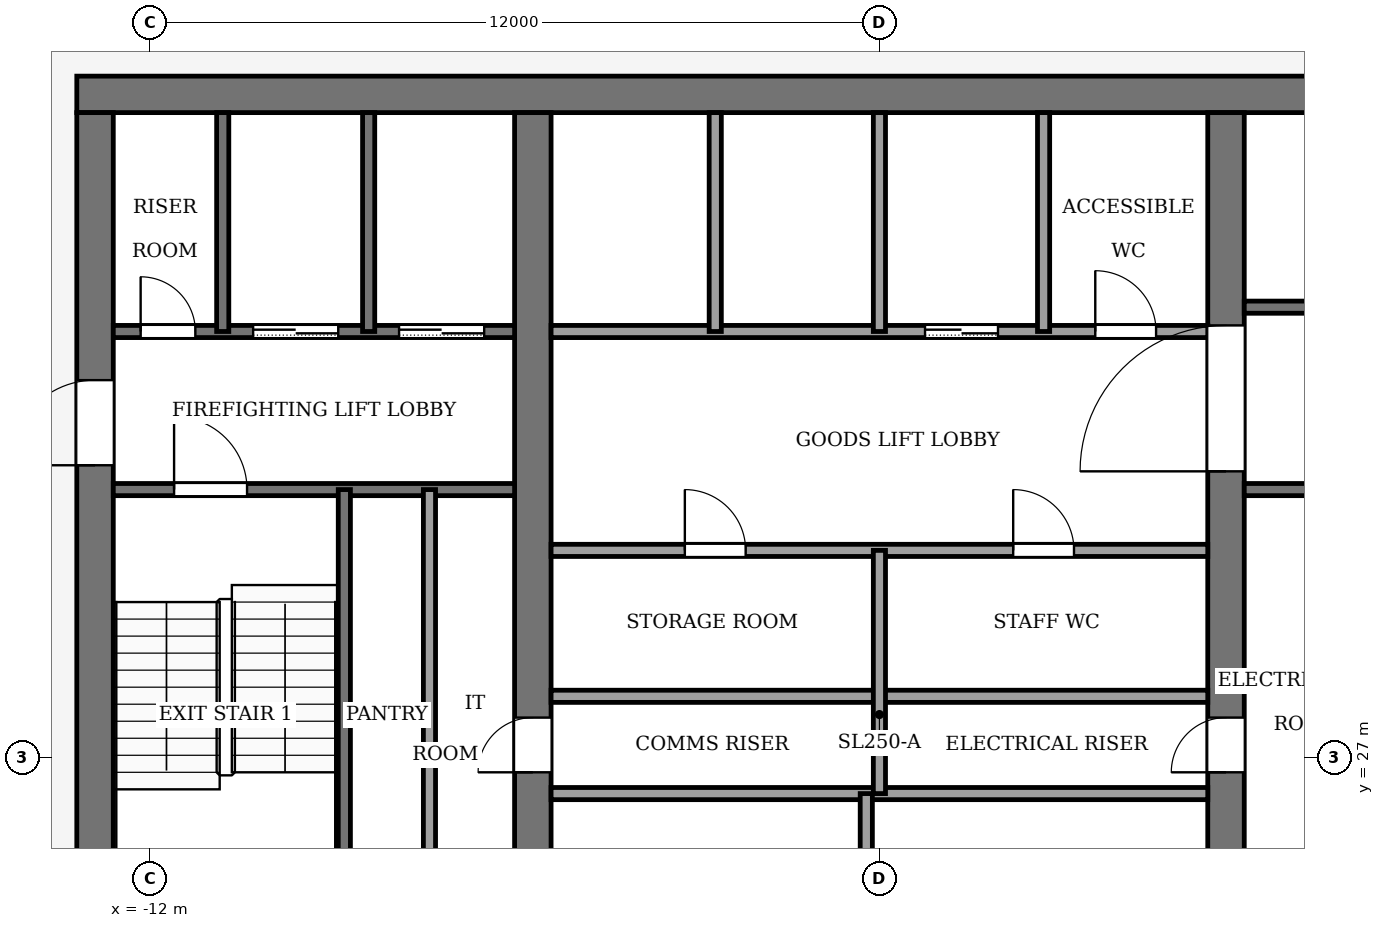
"""IFC4 building model, lengths in metres.
Left out: names, types, materials, properties, quantities, classifications, styles, units other than length and angle.
Written with IfcOpenShell. Run it as: python <this file> out.ifc"""

import sys

from ifc_helpers import new_model, si_unit, direction, frame, frame_2d, origin, place, context, subcontext, project, spatial, rectangle, extrude, element, fill, save


model = new_model("IFC4")
c1 = context("Model", 3, precision=1e-05, world=origin(), true_north=direction((0.0, 1.0)))
c2 = subcontext(c1, "Body", "Model", "MODEL_VIEW")
j1 = project(units=[si_unit("LENGTHUNIT", "METRE"), si_unit("PLANEANGLEUNIT", "RADIAN")], contexts=[c1])
p1 = place(None, origin())
s1 = spatial("IfcSite", under=j1, at=p1, CompositionType="ELEMENT")
p2 = place(p1, origin())
s2 = spatial("IfcBuilding", under=s1, at=p2, CompositionType="ELEMENT")
p3 = place(p2, frame((0.0, 0.0, 302.0)))
s3 = spatial("IfcBuildingStorey", under=s2, at=p3, CompositionType="ELEMENT", Elevation=302.0)
p4 = place(p3, frame((-13.2, 37.9, -0.13), z_axis=(0.0, 0.0, 1.0), x_axis=(1.0, 0.0, 0.0)))
e1 = element("IfcWall", 1, at=p4, inside=s3, PredefinedType="SHEAR", context=c2, shape_type="SweptSolid", body=[
    extrude(rectangle(XDim=26.4, YDim=0.6, at=frame_2d((13.2, 0.0))), origin(), (0.0, 0.0, 1.0), 4.0),
])
p5 = place(p3, frame((-12.9, 18.4, -0.13), z_axis=(0.0, 0.0, 1.0), x_axis=(0.0, 1.0, 0.0)))
e2 = element("IfcWall", 2, at=p5, inside=s3, PredefinedType="SHEAR", context=c2, shape_type="SweptSolid", body=[
    extrude(rectangle(XDim=19.2, YDim=0.6, at=frame_2d((9.6, 0.0))), origin(), (0.0, 0.0, 1.0), 4.0),
])
p6 = place(p5, frame((2.8, 0.0, 0.13)))
e3 = element("IfcOpeningElement", 3, at=p6, cuts=e2, PredefinedType="OPENING", context=c2, shape_type="SweptSolid", body=[
    extrude(rectangle(XDim=2.4, YDim=2.4, at=frame_2d((1.2, 1.2))), frame((0.0, 0.31, 0.0), z_axis=(0.0, -1.0, 0.0), x_axis=(1.0, 0.0, 0.0)), (0.0, 0.0, 1.0), 0.62),
])
p7 = place(p5, frame((13.4, 0.0, 0.13)))
e4 = element("IfcOpeningElement", 4, at=p7, cuts=e2, PredefinedType="OPENING", context=c2, shape_type="SweptSolid", body=[
    extrude(rectangle(XDim=1.4, YDim=2.2, at=frame_2d((0.7, 1.1))), frame((0.0, 0.31, 0.0), z_axis=(0.0, -1.0, 0.0), x_axis=(1.0, 0.0, 0.0)), (0.0, 0.0, 1.0), 0.62),
])
p8 = place(p3, frame((-5.7, 18.4, -0.13), z_axis=(0.0, 0.0, 1.0), x_axis=(0.0, 1.0, 0.0)))
e5 = element("IfcWall", 5, at=p8, inside=s3, PredefinedType="SHEAR", context=c2, shape_type="SweptSolid", body=[
    extrude(rectangle(XDim=19.2, YDim=0.6, at=frame_2d((9.6, 0.0))), origin(), (0.0, 0.0, 1.0), 4.0),
])
p9 = place(p8, frame((8.35, 0.0, 0.13)))
e6 = element("IfcOpeningElement", 6, at=p9, cuts=e5, PredefinedType="OPENING", context=c2, shape_type="SweptSolid", body=[
    extrude(rectangle(XDim=0.9, YDim=2.1, at=frame_2d((0.45, 1.05))), frame((0.0, 0.31, 0.0), z_axis=(0.0, -1.0, 0.0), x_axis=(1.0, 0.0, 0.0)), (0.0, 0.0, 1.0), 0.62),
])
p10 = place(p3, frame((5.7, 18.4, -0.13), z_axis=(0.0, 0.0, 1.0), x_axis=(0.0, 1.0, 0.0)))
e7 = element("IfcWall", 7, at=p10, inside=s3, PredefinedType="SHEAR", context=c2, shape_type="SweptSolid", body=[
    extrude(rectangle(XDim=19.2, YDim=0.6, at=frame_2d((9.6, 0.0))), origin(), (0.0, 0.0, 1.0), 4.0),
])
p11 = place(p10, frame((8.35, 0.0, 0.13)))
e8 = element("IfcOpeningElement", 8, at=p11, cuts=e7, PredefinedType="OPENING", context=c2, shape_type="SweptSolid", body=[
    extrude(rectangle(XDim=0.9, YDim=2.1, at=frame_2d((0.45, 1.05))), frame((0.0, 0.31, 0.0), z_axis=(0.0, -1.0, 0.0), x_axis=(1.0, 0.0, 0.0)), (0.0, 0.0, 1.0), 0.62),
])
p12 = place(p10, frame((13.3, 0.0, 0.13)))
e9 = element("IfcOpeningElement", 9, at=p12, cuts=e7, PredefinedType="OPENING", context=c2, shape_type="SweptSolid", body=[
    extrude(rectangle(XDim=2.4, YDim=2.4, at=frame_2d((1.2, 1.2))), frame((0.0, 0.31, 0.0), z_axis=(0.0, -1.0, 0.0), x_axis=(1.0, 0.0, 0.0)), (0.0, 0.0, 1.0), 0.62),
])
for number, where, z_axis, x_axis in (
    (10, (-5.4, 26.4, 0.0), (0.0, 0.0, 1.0), (1.0, 0.0, 0.0)),
    (11, (-5.4, 28.0, 0.0), (0.0, 0.0, 1.0), (1.0, 0.0, 0.0)),
):
    element("IfcWall", number, at=place(p3, frame(where, z_axis=z_axis, x_axis=x_axis)), inside=s3, PredefinedType="PARTITIONING", context=c2, shape_type="SweptSolid", body=[
        extrude(rectangle(XDim=10.8, YDim=0.2, at=frame_2d((5.4, 0.0))), origin(), (0.0, 0.0, 1.0), 3.87),
    ])
p13 = place(p3, frame((-5.4, 30.4, 0.0), z_axis=(0.0, 0.0, 1.0), x_axis=(1.0, 0.0, 0.0)))
e12 = element("IfcWall", 12, at=p13, inside=s3, PredefinedType="PARTITIONING", context=c2, shape_type="SweptSolid", body=[
    extrude(rectangle(XDim=10.8, YDim=0.2, at=frame_2d((5.4, 0.0))), origin(), (0.0, 0.0, 1.0), 3.87),
])
p14 = place(p13, frame((2.2, 0.0, 0.0)))
e13 = element("IfcOpeningElement", 13, at=p14, cuts=e12, PredefinedType="OPENING", context=c2, shape_type="SweptSolid", body=[
    extrude(rectangle(XDim=1.0, YDim=2.1, at=frame_2d((0.5, 1.05))), frame((0.0, 0.11, 0.0), z_axis=(0.0, -1.0, 0.0), x_axis=(1.0, 0.0, 0.0)), (0.0, 0.0, 1.0), 0.22),
])
p15 = place(p13, frame((7.6, 0.0, 0.0)))
e14 = element("IfcOpeningElement", 14, at=p15, cuts=e12, PredefinedType="OPENING", context=c2, shape_type="SweptSolid", body=[
    extrude(rectangle(XDim=1.0, YDim=2.1, at=frame_2d((0.5, 1.05))), frame((0.0, 0.11, 0.0), z_axis=(0.0, -1.0, 0.0), x_axis=(1.0, 0.0, 0.0)), (0.0, 0.0, 1.0), 0.22),
])
p16 = place(p3, frame((-12.6, 31.4, 0.0), z_axis=(0.0, 0.0, 1.0), x_axis=(1.0, 0.0, 0.0)))
e15 = element("IfcWall", 15, at=p16, inside=s3, PredefinedType="PARTITIONING", context=c2, shape_type="SweptSolid", body=[
    extrude(rectangle(XDim=6.6, YDim=0.2, at=frame_2d((3.3, 0.0))), origin(), (0.0, 0.0, 1.0), 3.87),
])
p17 = place(p16, frame((1.0, 0.0, 0.0)))
e16 = element("IfcOpeningElement", 16, at=p17, cuts=e15, PredefinedType="OPENING", context=c2, shape_type="SweptSolid", body=[
    extrude(rectangle(XDim=1.2, YDim=2.2, at=frame_2d((0.6, 1.1))), frame((0.0, 0.11, 0.0), z_axis=(0.0, -1.0, 0.0), x_axis=(1.0, 0.0, 0.0)), (0.0, 0.0, 1.0), 0.22),
])
p18 = place(p3, frame((6.0, 31.4, 0.0), z_axis=(0.0, 0.0, 1.0), x_axis=(1.0, 0.0, 0.0)))
e17 = element("IfcWall", 17, at=p18, inside=s3, PredefinedType="PARTITIONING", context=c2, shape_type="SweptSolid", body=[
    extrude(rectangle(XDim=6.6, YDim=0.2, at=frame_2d((3.3, 0.0))), origin(), (0.0, 0.0, 1.0), 3.87),
])
p19 = place(p3, frame((-12.6, 34.0, 0.0), z_axis=(0.0, 0.0, 1.0), x_axis=(1.0, 0.0, 0.0)))
e18 = element("IfcWall", 18, at=p19, inside=s3, PredefinedType="PARTITIONING", context=c2, shape_type="SweptSolid", body=[
    extrude(rectangle(XDim=6.6, YDim=0.2, at=frame_2d((3.3, 0.0))), origin(), (0.0, 0.0, 1.0), 3.87),
])
p20 = place(p19, frame((4.7, 0.0, 0.0)))
e19 = element("IfcOpeningElement", 19, at=p20, cuts=e18, PredefinedType="OPENING", context=c2, shape_type="SweptSolid", body=[
    extrude(rectangle(XDim=1.4, YDim=2.2, at=frame_2d((0.7, 1.1))), frame((0.0, 0.11, 0.0), z_axis=(0.0, -1.0, 0.0), x_axis=(1.0, 0.0, 0.0)), (0.0, 0.0, 1.0), 0.22),
])
p21 = place(p19, frame((2.3, 0.0, 0.0)))
e20 = element("IfcOpeningElement", 20, at=p21, cuts=e18, PredefinedType="OPENING", context=c2, shape_type="SweptSolid", body=[
    extrude(rectangle(XDim=1.4, YDim=2.2, at=frame_2d((0.7, 1.1))), frame((0.0, 0.11, 0.0), z_axis=(0.0, -1.0, 0.0), x_axis=(1.0, 0.0, 0.0)), (0.0, 0.0, 1.0), 0.22),
])
p22 = place(p19, frame((0.45, 0.0, 0.0)))
e21 = element("IfcOpeningElement", 21, at=p22, cuts=e18, PredefinedType="OPENING", context=c2, shape_type="SweptSolid", body=[
    extrude(rectangle(XDim=0.9, YDim=2.1, at=frame_2d((0.45, 1.05))), frame((0.0, 0.11, 0.0), z_axis=(0.0, -1.0, 0.0), x_axis=(1.0, 0.0, 0.0)), (0.0, 0.0, 1.0), 0.22),
])
p23 = place(p3, frame((-5.4, 34.0, 0.0), z_axis=(0.0, 0.0, 1.0), x_axis=(1.0, 0.0, 0.0)))
e22 = element("IfcWall", 22, at=p23, inside=s3, PredefinedType="PARTITIONING", context=c2, shape_type="SweptSolid", body=[
    extrude(rectangle(XDim=10.8, YDim=0.2, at=frame_2d((5.4, 0.0))), origin(), (0.0, 0.0, 1.0), 3.87),
])
p24 = place(p23, frame((6.15, 0.0, 0.0)))
e23 = element("IfcOpeningElement", 23, at=p24, cuts=e22, PredefinedType="OPENING", context=c2, shape_type="SweptSolid", body=[
    extrude(rectangle(XDim=1.2, YDim=2.2, at=frame_2d((0.6, 1.1))), frame((0.0, 0.11, 0.0), z_axis=(0.0, -1.0, 0.0), x_axis=(1.0, 0.0, 0.0)), (0.0, 0.0, 1.0), 0.22),
])
p25 = place(p23, frame((8.95, 0.0, 0.0)))
e24 = element("IfcOpeningElement", 24, at=p25, cuts=e22, PredefinedType="OPENING", context=c2, shape_type="SweptSolid", body=[
    extrude(rectangle(XDim=1.0, YDim=2.1, at=frame_2d((0.5, 1.05))), frame((0.0, 0.11, 0.0), z_axis=(0.0, -1.0, 0.0), x_axis=(1.0, 0.0, 0.0)), (0.0, 0.0, 1.0), 0.22),
])
p26 = place(p3, frame((6.0, 34.4, 0.0), z_axis=(0.0, 0.0, 1.0), x_axis=(1.0, 0.0, 0.0)))
e25 = element("IfcWall", 25, at=p26, inside=s3, PredefinedType="PARTITIONING", context=c2, shape_type="SweptSolid", body=[
    extrude(rectangle(XDim=6.6, YDim=0.2, at=frame_2d((3.3, 0.0))), origin(), (0.0, 0.0, 1.0), 3.87),
])
p27 = place(p26, frame((4.8, 0.0, 0.0)))
e26 = element("IfcOpeningElement", 26, at=p27, cuts=e25, PredefinedType="OPENING", context=c2, shape_type="SweptSolid", body=[
    extrude(rectangle(XDim=1.2, YDim=2.2, at=frame_2d((0.6, 1.1))), frame((0.0, 0.11, 0.0), z_axis=(0.0, -1.0, 0.0), x_axis=(1.0, 0.0, 0.0)), (0.0, 0.0, 1.0), 0.22),
])
p28 = place(p3, frame((-10.8, 34.0, 0.0), z_axis=(0.0, 0.0, 1.0), x_axis=(0.0, 1.0, 0.0)))
e27 = element("IfcWall", 27, at=p28, inside=s3, PredefinedType="PARTITIONING", context=c2, shape_type="SweptSolid", body=[
    extrude(rectangle(XDim=3.6, YDim=0.2, at=frame_2d((1.8, 0.0))), origin(), (0.0, 0.0, 1.0), 3.87),
])
p29 = place(p3, frame((-8.8, 24.0, 0.0), z_axis=(0.0, 0.0, 1.0), x_axis=(0.0, 1.0, 0.0)))
e28 = element("IfcWall", 28, at=p29, inside=s3, PredefinedType="PARTITIONING", context=c2, shape_type="SweptSolid", body=[
    extrude(rectangle(XDim=7.4, YDim=0.2, at=frame_2d((3.7, 0.0))), origin(), (0.0, 0.0, 1.0), 3.87),
])
p30 = place(p3, frame((-8.4, 34.0, 0.0), z_axis=(0.0, 0.0, 1.0), x_axis=(0.0, 1.0, 0.0)))
e29 = element("IfcWall", 29, at=p30, inside=s3, PredefinedType="PARTITIONING", context=c2, shape_type="SweptSolid", body=[
    extrude(rectangle(XDim=3.6, YDim=0.2, at=frame_2d((1.8, 0.0))), origin(), (0.0, 0.0, 1.0), 3.87),
])
p31 = place(p3, frame((-7.4, 24.0, 0.0), z_axis=(0.0, 0.0, 1.0), x_axis=(0.0, 1.0, 0.0)))
e30 = element("IfcWall", 30, at=p31, inside=s3, PredefinedType="PARTITIONING", context=c2, shape_type="SweptSolid", body=[
    extrude(rectangle(XDim=7.4, YDim=0.2, at=frame_2d((3.7, 0.0))), origin(), (0.0, 0.0, 1.0), 3.87),
])
p32 = place(p3, frame((-2.7, 34.0, 0.0), z_axis=(0.0, 0.0, 1.0), x_axis=(0.0, 1.0, 0.0)))
e31 = element("IfcWall", 31, at=p32, inside=s3, PredefinedType="PARTITIONING", context=c2, shape_type="SweptSolid", body=[
    extrude(rectangle(XDim=3.6, YDim=0.2, at=frame_2d((1.8, 0.0))), origin(), (0.0, 0.0, 1.0), 3.87),
])
p33 = place(p3, frame((-0.216, 24.0, 0.0), z_axis=(0.0, 0.0, 1.0), x_axis=(0.0, 1.0, 0.0)))
e32 = element("IfcWall", 32, at=p33, inside=s3, PredefinedType="PARTITIONING", context=c2, shape_type="SweptSolid", body=[
    extrude(rectangle(XDim=2.4, YDim=0.2, at=frame_2d((1.2, 0.0))), origin(), (0.0, 0.0, 1.0), 3.87),
])
p34 = place(p3, frame((0.0, 26.4, 0.0), z_axis=(0.0, 0.0, 1.0), x_axis=(0.0, 1.0, 0.0)))
e33 = element("IfcWall", 33, at=p34, inside=s3, PredefinedType="PARTITIONING", context=c2, shape_type="SweptSolid", body=[
    extrude(rectangle(XDim=4.0, YDim=0.2, at=frame_2d((2.0, 0.0))), origin(), (0.0, 0.0, 1.0), 3.87),
])
for number, where, z_axis, x_axis in (
    (34, (0.0, 34.0, 0.0), (0.0, 0.0, 1.0), (0.0, 1.0, 0.0)),
    (35, (2.7, 34.0, 0.0), (0.0, 0.0, 1.0), (0.0, 1.0, 0.0)),
):
    element("IfcWall", number, at=place(p3, frame(where, z_axis=z_axis, x_axis=x_axis)), inside=s3, PredefinedType="PARTITIONING", context=c2, shape_type="SweptSolid", body=[
        extrude(rectangle(XDim=3.6, YDim=0.2, at=frame_2d((1.8, 0.0))), origin(), (0.0, 0.0, 1.0), 3.87),
    ])
p35 = place(p24, origin())
e36 = element("IfcDoor", 36, at=p35, inside=s3, OperationType="SLIDING_TO_LEFT", PredefinedType="DOOR", context=c2, shape_type="SweptSolid", body=[
    extrude(rectangle(XDim=1.2, YDim=2.2, at=frame_2d((0.6, 1.1))), frame((0.0, 0.025, 0.0), z_axis=(0.0, -1.0, 0.0), x_axis=(1.0, 0.0, 0.0)), (0.0, 0.0, 1.0), 0.05),
])
fill(e23, e36)
p36 = place(p20, origin())
e37 = element("IfcDoor", 37, at=p36, inside=s3, OperationType="SLIDING_TO_LEFT", PredefinedType="DOOR", context=c2, shape_type="SweptSolid", body=[
    extrude(rectangle(XDim=1.4, YDim=2.2, at=frame_2d((0.7, 1.1))), frame((0.0, 0.025, 0.0), z_axis=(0.0, -1.0, 0.0), x_axis=(1.0, 0.0, 0.0)), (0.0, 0.0, 1.0), 0.05),
])
fill(e19, e37)
p37 = place(p21, origin())
e38 = element("IfcDoor", 38, at=p37, inside=s3, OperationType="SLIDING_TO_LEFT", PredefinedType="DOOR", context=c2, shape_type="SweptSolid", body=[
    extrude(rectangle(XDim=1.4, YDim=2.2, at=frame_2d((0.7, 1.1))), frame((0.0, 0.025, 0.0), z_axis=(0.0, -1.0, 0.0), x_axis=(1.0, 0.0, 0.0)), (0.0, 0.0, 1.0), 0.05),
])
fill(e20, e38)
p38 = place(p22, origin())
e39 = element("IfcDoor", 39, at=p38, inside=s3, OperationType="SINGLE_SWING_RIGHT", PredefinedType="DOOR", context=c2, shape_type="SweptSolid", body=[
    extrude(rectangle(XDim=0.9, YDim=2.1, at=frame_2d((0.45, 1.05))), frame((0.0, 0.025, 0.0), z_axis=(0.0, -1.0, 0.0), x_axis=(1.0, 0.0, 0.0)), (0.0, 0.0, 1.0), 0.05),
])
fill(e21, e39)
p39 = place(p14, origin())
e40 = element("IfcDoor", 40, at=p39, inside=s3, OperationType="SINGLE_SWING_LEFT", PredefinedType="DOOR", context=c2, shape_type="SweptSolid", body=[
    extrude(rectangle(XDim=1.0, YDim=2.1, at=frame_2d((0.5, 1.05))), frame((0.0, 0.025, 0.0), z_axis=(0.0, -1.0, 0.0), x_axis=(1.0, 0.0, 0.0)), (0.0, 0.0, 1.0), 0.05),
])
fill(e13, e40)
p40 = place(p15, origin())
e41 = element("IfcDoor", 41, at=p40, inside=s3, OperationType="SINGLE_SWING_RIGHT", PredefinedType="DOOR", context=c2, shape_type="SweptSolid", body=[
    extrude(rectangle(XDim=1.0, YDim=2.1, at=frame_2d((0.5, 1.05))), frame((0.0, 0.025, 0.0), z_axis=(0.0, -1.0, 0.0), x_axis=(1.0, 0.0, 0.0)), (0.0, 0.0, 1.0), 0.05),
])
fill(e14, e41)
p41 = place(p25, origin())
e42 = element("IfcDoor", 42, at=p41, inside=s3, OperationType="SINGLE_SWING_LEFT", PredefinedType="DOOR", context=c2, shape_type="SweptSolid", body=[
    extrude(rectangle(XDim=1.0, YDim=2.1, at=frame_2d((0.5, 1.05))), frame((0.0, 0.025, 0.0), z_axis=(0.0, -1.0, 0.0), x_axis=(1.0, 0.0, 0.0)), (0.0, 0.0, 1.0), 0.05),
])
fill(e24, e42)
p42 = place(p9, origin())
e43 = element("IfcDoor", 43, at=p42, inside=s3, OperationType="SINGLE_SWING_LEFT", PredefinedType="DOOR", context=c2, shape_type="SweptSolid", body=[
    extrude(rectangle(XDim=0.9, YDim=2.1, at=frame_2d((0.45, 1.05))), frame((0.0, 0.025, 0.0), z_axis=(0.0, -1.0, 0.0), x_axis=(1.0, 0.0, 0.0)), (0.0, 0.0, 1.0), 0.05),
])
fill(e6, e43)
p43 = place(p11, origin())
e44 = element("IfcDoor", 44, at=p43, inside=s3, OperationType="SINGLE_SWING_RIGHT", PredefinedType="DOOR", context=c2, shape_type="SweptSolid", body=[
    extrude(rectangle(XDim=0.9, YDim=2.1, at=frame_2d((0.45, 1.05))), frame((0.0, 0.025, 0.0), z_axis=(0.0, -1.0, 0.0), x_axis=(1.0, 0.0, 0.0)), (0.0, 0.0, 1.0), 0.05),
])
fill(e8, e44)
p44 = place(p17, origin())
e45 = element("IfcDoor", 45, at=p44, inside=s3, OperationType="SINGLE_SWING_RIGHT", PredefinedType="DOOR", context=c2, shape_type="SweptSolid", body=[
    extrude(rectangle(XDim=1.2, YDim=2.2, at=frame_2d((0.6, 1.1))), frame((0.0, 0.025, 0.0), z_axis=(0.0, -1.0, 0.0), x_axis=(1.0, 0.0, 0.0)), (0.0, 0.0, 1.0), 0.05),
])
fill(e16, e45)
p45 = place(p12, origin())
e46 = element("IfcDoor", 46, at=p45, inside=s3, OperationType="DOUBLE_DOOR_SINGLE_SWING", PredefinedType="DOOR", context=c2, shape_type="SweptSolid", body=[
    extrude(rectangle(XDim=2.4, YDim=2.4, at=frame_2d((1.2, 1.2))), frame((0.0, 0.025, 0.0), z_axis=(0.0, -1.0, 0.0), x_axis=(1.0, 0.0, 0.0)), (0.0, 0.0, 1.0), 0.05),
])
fill(e9, e46)
p46 = place(p7, origin())
e47 = element("IfcDoor", 47, at=p46, inside=s3, OperationType="SINGLE_SWING_RIGHT", PredefinedType="DOOR", context=c2, shape_type="SweptSolid", body=[
    extrude(rectangle(XDim=1.4, YDim=2.2, at=frame_2d((0.7, 1.1))), frame((0.0, 0.025, 0.0), z_axis=(0.0, -1.0, 0.0), x_axis=(1.0, 0.0, 0.0)), (0.0, 0.0, 1.0), 0.05),
])
fill(e4, e47)
save(model, sys.argv[1])
